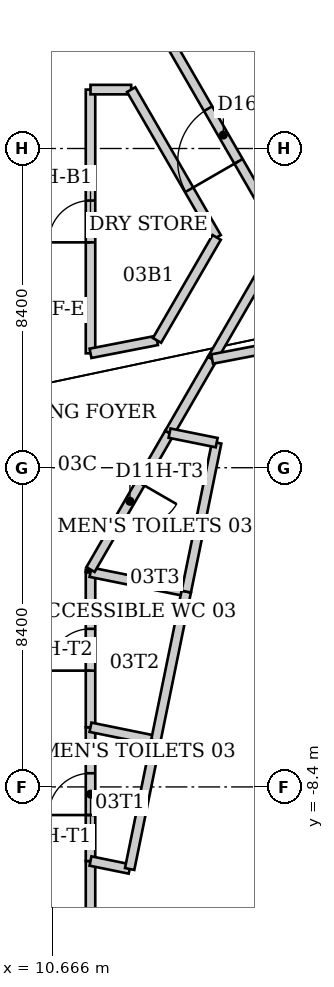
"""IFC4 building model, lengths in metres.
Left out: names, types, materials, properties, quantities, classifications, styles, units other than length and angle.
Written with IfcOpenShell. Run it as: python <this file> out.ifc"""

import sys

from ifc_helpers import new_model, si_unit, direction, frame, frame_2d, origin, place, context, subcontext, project, spatial, rectangle, extrude, element, fill, save


model = new_model("IFC4")
c1 = context("Model", 3, precision=1e-05, world=origin(), true_north=direction((0.0, 1.0)))
c2 = subcontext(c1, "Body", "Model", "MODEL_VIEW")
j1 = project(units=[si_unit("LENGTHUNIT", "METRE"), si_unit("PLANEANGLEUNIT", "RADIAN")], contexts=[c1])
p1 = place(None, origin())
s1 = spatial("IfcSite", under=j1, at=p1, CompositionType="ELEMENT")
p2 = place(p1, origin())
s2 = spatial("IfcBuilding", under=s1, at=p2, CompositionType="ELEMENT")
p3 = place(p2, frame((0.0, 0.0, 18.0)))
s3 = spatial("IfcBuildingStorey", under=s2, at=p3, CompositionType="ELEMENT", Elevation=18.0)
p4 = place(p3, frame((13.794, -36.498, -0.15), z_axis=(0.0, 0.0, 1.0), x_axis=(0.500000964025, 0.866024847203, 0.0)))
e1 = element("IfcWall", 1, at=p4, inside=s3, PredefinedType="PARAPET", context=c2, shape_type="SweptSolid", body=[
    extrude(rectangle(XDim=49.423, YDim=0.25, at=frame_2d((24.712, 0.0))), origin(), (0.0, 0.0, 1.0), 1.25),
])
p5 = place(p3, frame((11.67, -13.12, 0.0), z_axis=(0.0, 0.0, 1.0), x_axis=(0.0, 1.0, 0.0)))
e2 = element("IfcWall", 2, at=p5, inside=s3, PredefinedType="PARTITIONING", context=c2, shape_type="SweptSolid", body=[
    extrude(rectangle(XDim=2.77, YDim=0.25, at=frame_2d((1.385, 0.0))), origin(), (0.0, 0.0, 1.0), 4.84),
])
p6 = place(p3, frame((11.67, -10.35, 0.0), z_axis=(0.0, 0.0, 1.0), x_axis=(0.0, 1.0, 0.0)))
e3 = element("IfcWall", 3, at=p6, inside=s3, PredefinedType="PARTITIONING", context=c2, shape_type="SweptSolid", body=[
    extrude(rectangle(XDim=3.52, YDim=0.25, at=frame_2d((1.76, 0.0))), origin(), (0.0, 0.0, 1.0), 4.84),
])
p7 = place(p6, frame((1.21, 0.0, 0.0)))
e4 = element("IfcOpeningElement", 4, at=p7, cuts=e3, PredefinedType="OPENING", context=c2, shape_type="SweptSolid", body=[
    extrude(rectangle(XDim=1.1, YDim=2.2, at=frame_2d((0.55, 1.1))), frame((0.0, 0.125, 0.0), z_axis=(0.0, -1.0, 0.0), x_axis=(1.0, 0.0, 0.0)), (0.0, 0.0, 1.0), 0.25),
])
p8 = place(p3, frame((11.67, -10.35, 0.0), z_axis=(0.0, 0.0, 1.0), x_axis=(0.979850463212, -0.199732495464, 0.0)))
e5 = element("IfcWall", 5, at=p8, inside=s3, PredefinedType="PARTITIONING", context=c2, shape_type="SweptSolid", body=[
    extrude(rectangle(XDim=1.051, YDim=0.25, at=frame_2d((0.526, 0.0))), origin(), (0.0, 0.0, 1.0), 4.84),
])
p9 = place(p3, frame((11.67, -6.83, 0.0), z_axis=(0.0, 0.0, 1.0), x_axis=(0.0, 1.0, 0.0)))
e6 = element("IfcWall", 6, at=p9, inside=s3, PredefinedType="PARTITIONING", context=c2, shape_type="SweptSolid", body=[
    extrude(rectangle(XDim=4.08, YDim=0.25, at=frame_2d((2.04, 0.0))), origin(), (0.0, 0.0, 1.0), 4.84),
])
p10 = place(p9, frame((1.49, 0.0, 0.0)))
e7 = element("IfcOpeningElement", 7, at=p10, cuts=e6, PredefinedType="OPENING", context=c2, shape_type="SweptSolid", body=[
    extrude(rectangle(XDim=1.1, YDim=2.2, at=frame_2d((0.55, 1.1))), frame((0.0, 0.125, 0.0), z_axis=(0.0, -1.0, 0.0), x_axis=(1.0, 0.0, 0.0)), (0.0, 0.0, 1.0), 0.25),
])
p11 = place(p3, frame((11.67, -6.83, 0.0), z_axis=(0.0, 0.0, 1.0), x_axis=(0.979933438949, -0.199324999008, 0.0)))
e8 = element("IfcWall", 8, at=p11, inside=s3, PredefinedType="PARTITIONING", context=c2, shape_type="SweptSolid", body=[
    extrude(rectangle(XDim=1.755, YDim=0.25, at=frame_2d((0.877, 0.0))), origin(), (0.0, 0.0, 1.0), 4.84),
])
p12 = place(p3, frame((11.67, -2.75, 0.0), z_axis=(0.0, 0.0, 1.0), x_axis=(0.0, 1.0, 0.0)))
e9 = element("IfcWall", 9, at=p12, inside=s3, PredefinedType="PARTITIONING", context=c2, shape_type="SweptSolid", body=[
    extrude(rectangle(XDim=0.07, YDim=0.25, at=frame_2d((0.035, 0.0))), origin(), (0.0, 0.0, 1.0), 4.84),
])
p13 = place(p3, frame((11.67, -2.75, 0.0), z_axis=(0.0, 0.0, 1.0), x_axis=(0.980128891602, -0.19836167938, 0.0)))
e10 = element("IfcWall", 10, at=p13, inside=s3, PredefinedType="PARTITIONING", context=c2, shape_type="SweptSolid", body=[
    extrude(rectangle(XDim=2.571, YDim=0.25, at=frame_2d((1.286, 0.0))), origin(), (0.0, 0.0, 1.0), 4.84),
])
p14 = place(p3, frame((11.67, 3.01, 0.0), z_axis=(0.0, 0.0, 1.0), x_axis=(0.0, 1.0, 0.0)))
e11 = element("IfcWall", 11, at=p14, inside=s3, PredefinedType="PARTITIONING", context=c2, shape_type="SweptSolid", body=[
    extrude(rectangle(XDim=6.94, YDim=0.25, at=frame_2d((3.47, 0.0))), origin(), (0.0, 0.0, 1.0), 4.84),
])
p15 = place(p14, frame((2.92, 0.0, 0.0)))
e12 = element("IfcOpeningElement", 12, at=p15, cuts=e11, PredefinedType="OPENING", context=c2, shape_type="SweptSolid", body=[
    extrude(rectangle(XDim=1.1, YDim=2.2, at=frame_2d((0.55, 1.1))), frame((0.0, 0.125, 0.0), z_axis=(0.0, -1.0, 0.0), x_axis=(1.0, 0.0, 0.0)), (0.0, 0.0, 1.0), 0.25),
])
p16 = place(p3, frame((11.67, 9.95, 0.0), z_axis=(0.0, 0.0, 1.0), x_axis=(1.0, 0.0, 0.0)))
e13 = element("IfcWall", 13, at=p16, inside=s3, PredefinedType="PARTITIONING", context=c2, shape_type="SweptSolid", body=[
    extrude(rectangle(XDim=1.07, YDim=0.25, at=frame_2d((0.535, 0.0))), origin(), (0.0, 0.0, 1.0), 4.84),
])
p17 = place(p3, frame((12.7, -10.56, 0.0), z_axis=(0.0, 0.0, 1.0), x_axis=(0.199993288323, 0.979797267105, 0.0)))
e14 = element("IfcWall", 14, at=p17, inside=s3, PredefinedType="PARTITIONING", context=c2, shape_type="SweptSolid", body=[
    extrude(rectangle(XDim=3.45, YDim=0.25, at=frame_2d((1.725, 0.0))), origin(), (0.0, 0.0, 1.0), 4.84),
])
p18 = place(p3, frame((12.74, 9.95, 0.0), z_axis=(0.0, 0.0, 1.0), x_axis=(0.50069571766, -0.865623358232, 0.0)))
e15 = element("IfcWall", 15, at=p18, inside=s3, PredefinedType="PARTITIONING", context=c2, shape_type="SweptSolid", body=[
    extrude(rectangle(XDim=4.494, YDim=0.25, at=frame_2d((2.247, 0.0))), origin(), (0.0, 0.0, 1.0), 4.84),
])
p19 = place(p3, frame((13.39, -7.18, 0.0), z_axis=(0.0, 0.0, 1.0), x_axis=(0.199975554662, 0.979800886679, 0.0)))
e16 = element("IfcWall", 16, at=p19, inside=s3, PredefinedType="PARTITIONING", context=c2, shape_type="SweptSolid", body=[
    extrude(rectangle(XDim=4.001, YDim=0.25, at=frame_2d((2.0, 0.0))), origin(), (0.0, 0.0, 1.0), 4.84),
])
p20 = place(p3, frame((13.42, 3.35, 0.0), z_axis=(0.0, 0.0, 1.0), x_axis=(-0.981635340877, -0.190767024252, 0.0)))
e17 = element("IfcWall", 17, at=p20, inside=s3, PredefinedType="PARTITIONING", context=c2, shape_type="SweptSolid", body=[
    extrude(rectangle(XDim=1.783, YDim=0.25, at=frame_2d((0.891, 0.0))), origin(), (0.0, 0.0, 1.0), 4.84),
])
p21 = place(p3, frame((13.745, 0.913, 0.0), z_axis=(0.0, 0.0, 1.0), x_axis=(-0.50020799343, -0.865905285415, 0.0)))
e18 = element("IfcWall", 18, at=p21, inside=s3, PredefinedType="PARTITIONING", context=c2, shape_type="SweptSolid", body=[
    extrude(rectangle(XDim=4.149, YDim=0.25, at=frame_2d((2.075, 0.0))), origin(), (0.0, 0.0, 1.0), 4.84),
])
p22 = place(p21, frame((1.525, 0.0, 0.0)))
e19 = element("IfcOpeningElement", 19, at=p22, cuts=e18, PredefinedType="OPENING", context=c2, shape_type="SweptSolid", body=[
    extrude(rectangle(XDim=1.1, YDim=2.2, at=frame_2d((0.55, 1.1))), frame((0.0, 0.125, 0.0), z_axis=(0.0, -1.0, 0.0), x_axis=(1.0, 0.0, 0.0)), (0.0, 0.0, 1.0), 0.25),
])
p23 = place(p3, frame((13.745, 0.913, 0.0), z_axis=(0.0, 0.0, 1.0), x_axis=(0.500248658738, 0.865881792989, 0.0)))
e20 = element("IfcWall", 20, at=p23, inside=s3, PredefinedType="PARTITIONING", context=c2, shape_type="SweptSolid", body=[
    extrude(rectangle(XDim=2.249, YDim=0.25, at=frame_2d((1.125, 0.0))), origin(), (0.0, 0.0, 1.0), 4.84),
])
p24 = place(p3, frame((14.19, -3.26, 0.0), z_axis=(0.0, 0.0, 1.0), x_axis=(0.199975554662, 0.979800886679, 0.0)))
e21 = element("IfcWall", 21, at=p24, inside=s3, PredefinedType="PARTITIONING", context=c2, shape_type="SweptSolid", body=[
    extrude(rectangle(XDim=4.001, YDim=0.25, at=frame_2d((2.0, 0.0))), origin(), (0.0, 0.0, 1.0), 4.84),
])
p25 = place(p3, frame((14.87, 2.86, 0.0), z_axis=(0.0, 0.0, 1.0), x_axis=(0.500499855385, 0.86573661974, 0.0)))
e22 = element("IfcWall", 22, at=p25, inside=s3, PredefinedType="PARTITIONING", context=c2, shape_type="SweptSolid", body=[
    extrude(rectangle(XDim=3.697, YDim=0.25, at=frame_2d((1.848, 0.0))), origin(), (0.0, 0.0, 1.0), 4.84),
])
p26 = place(p3, frame((14.99, 0.66, 0.0), z_axis=(0.0, 0.0, 1.0), x_axis=(-0.98027513997, 0.197637673426, 0.0)))
e23 = element("IfcWall", 23, at=p26, inside=s3, PredefinedType="PARTITIONING", context=c2, shape_type="SweptSolid", body=[
    extrude(rectangle(XDim=1.265, YDim=0.25, at=frame_2d((0.632, 0.0))), origin(), (0.0, 0.0, 1.0), 4.84),
])
p27 = place(p3, frame((14.99, 6.06, 0.0), z_axis=(0.0, 0.0, 1.0), x_axis=(-0.501309724655, -0.865267912248, 0.0)))
e24 = element("IfcWall", 24, at=p27, inside=s3, PredefinedType="PARTITIONING", context=c2, shape_type="SweptSolid", body=[
    extrude(rectangle(XDim=3.132, YDim=0.25, at=frame_2d((1.566, 0.0))), origin(), (0.0, 0.0, 1.0), 4.84),
])
p28 = place(p3, frame((16.72, 6.06, 0.0), z_axis=(0.0, 0.0, 1.0), x_axis=(-0.499759814377, 0.866164030617, 0.0)))
e25 = element("IfcWall", 25, at=p28, inside=s3, PredefinedType="PARTITIONING", context=c2, shape_type="SweptSolid", body=[
    extrude(rectangle(XDim=6.223, YDim=0.25, at=frame_2d((3.111, 0.0))), origin(), (0.0, 0.0, 1.0), 4.84),
])
p29 = place(p28, frame((2.312, 0.0, 0.0)))
e26 = element("IfcOpeningElement", 26, at=p29, cuts=e25, PredefinedType="OPENING", context=c2, shape_type="SweptSolid", body=[
    extrude(rectangle(XDim=1.6, YDim=2.4, at=frame_2d((0.8, 1.2))), frame((0.0, 0.125, 0.0), z_axis=(0.0, -1.0, 0.0), x_axis=(1.0, 0.0, 0.0)), (0.0, 0.0, 1.0), 0.25),
])
p30 = place(p3, frame((30.591, 5.884, 0.0), z_axis=(0.0, 0.0, 1.0), x_axis=(-0.981994806005, -0.188907916665, 0.0)))
e27 = element("IfcWall", 27, at=p30, inside=s3, PredefinedType="PARTITIONING", context=c2, shape_type="SweptSolid", body=[
    extrude(rectangle(XDim=16.009, YDim=0.25, at=frame_2d((8.004, 0.0))), origin(), (0.0, 0.0, 1.0), 4.84),
])
p31 = place(p29, origin())
e28 = element("IfcDoor", 28, at=p31, inside=s3, OperationType="DOUBLE_DOOR_SINGLE_SWING", PredefinedType="DOOR", context=c2, shape_type="SweptSolid", body=[
    extrude(rectangle(XDim=1.6, YDim=2.4, at=frame_2d((0.8, 1.2))), frame((0.0, 0.025, 0.0), z_axis=(0.0, -1.0, 0.0), x_axis=(1.0, 0.0, 0.0)), (0.0, 0.0, 1.0), 0.05),
])
fill(e26, e28)
p32 = place(p7, origin())
e29 = element("IfcDoor", 29, at=p32, inside=s3, OperationType="SINGLE_SWING_LEFT", PredefinedType="DOOR", context=c2, shape_type="SweptSolid", body=[
    extrude(rectangle(XDim=1.1, YDim=2.2, at=frame_2d((0.55, 1.1))), frame((0.0, 0.025, 0.0), z_axis=(0.0, -1.0, 0.0), x_axis=(1.0, 0.0, 0.0)), (0.0, 0.0, 1.0), 0.05),
])
fill(e4, e29)
p33 = place(p10, origin())
e30 = element("IfcDoor", 30, at=p33, inside=s3, OperationType="SINGLE_SWING_LEFT", PredefinedType="DOOR", context=c2, shape_type="SweptSolid", body=[
    extrude(rectangle(XDim=1.1, YDim=2.2, at=frame_2d((0.55, 1.1))), frame((0.0, 0.025, 0.0), z_axis=(0.0, -1.0, 0.0), x_axis=(1.0, 0.0, 0.0)), (0.0, 0.0, 1.0), 0.05),
])
fill(e7, e30)
p34 = place(p22, origin())
e31 = element("IfcDoor", 31, at=p34, inside=s3, OperationType="SINGLE_SWING_LEFT", PredefinedType="DOOR", context=c2, shape_type="SweptSolid", body=[
    extrude(rectangle(XDim=1.1, YDim=2.2, at=frame_2d((0.55, 1.1))), frame((0.0, 0.025, 0.0), z_axis=(0.0, -1.0, 0.0), x_axis=(1.0, 0.0, 0.0)), (0.0, 0.0, 1.0), 0.05),
])
fill(e19, e31)
p35 = place(p15, origin())
e32 = element("IfcDoor", 32, at=p35, inside=s3, OperationType="SINGLE_SWING_LEFT", PredefinedType="DOOR", context=c2, shape_type="SweptSolid", body=[
    extrude(rectangle(XDim=1.1, YDim=2.2, at=frame_2d((0.55, 1.1))), frame((0.0, 0.025, 0.0), z_axis=(0.0, -1.0, 0.0), x_axis=(1.0, 0.0, 0.0)), (0.0, 0.0, 1.0), 0.05),
])
fill(e12, e32)
save(model, sys.argv[1])
